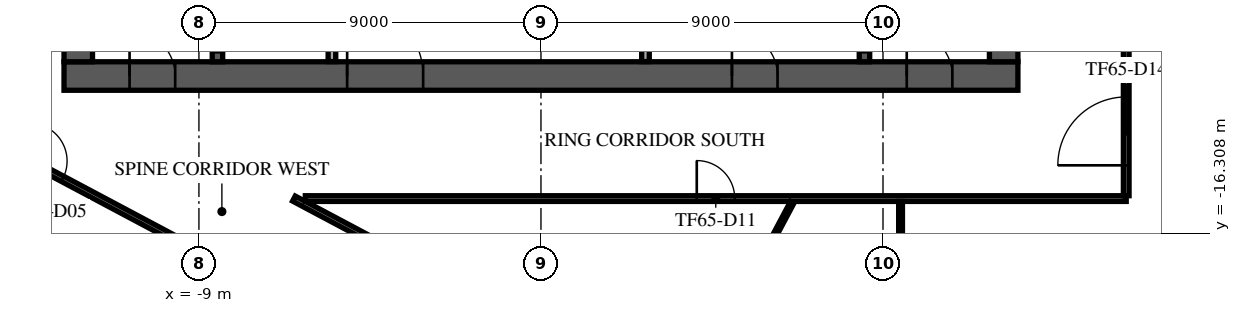
"""IFC4 building model, lengths in metres.
Left out: names, types, materials, properties, quantities, classifications, styles, units other than length and angle.
Written with IfcOpenShell. Run it as: python <this file> out.ifc"""

import sys

from ifc_helpers import new_model, si_unit, direction, frame, frame_2d, origin, place, context, subcontext, project, spatial, rectangle, extrude, element, fill, save


model = new_model("IFC4")
c1 = context("Model", 3, precision=1e-05, world=origin(), true_north=direction((0.0, 1.0)))
c2 = subcontext(c1, "Body", "Model", "MODEL_VIEW")
j1 = project(units=[si_unit("LENGTHUNIT", "METRE"), si_unit("PLANEANGLEUNIT", "RADIAN")], contexts=[c1])
p1 = place(None, origin())
s1 = spatial("IfcSite", under=j1, at=p1, CompositionType="ELEMENT")
p2 = place(p1, origin())
s2 = spatial("IfcBuilding", under=s1, at=p2, CompositionType="ELEMENT")
p3 = place(p2, frame((0.0, 0.0, 274.9)))
s3 = spatial("IfcBuildingStorey", under=s2, at=p3, CompositionType="ELEMENT", Elevation=274.9)
p4 = place(p3, frame((-12.55, -12.175, 0.0), z_axis=(0.0, 0.0, 1.0), x_axis=(1.0, 0.0, 0.0)))
e1 = element("IfcWall", 1, at=p4, inside=s3, PredefinedType="SHEAR", context=c2, shape_type="SweptSolid", body=[
    extrude(rectangle(XDim=25.1, YDim=0.75, at=frame_2d((12.55, 0.0))), origin(), (0.0, 0.0, 1.0), 3.64),
])
p5 = place(p4, frame((7.45, 0.0, 0.0)))
e2 = element("IfcOpeningElement", 2, at=p5, cuts=e1, PredefinedType="OPENING", context=c2, shape_type="SweptSolid", body=[
    extrude(rectangle(XDim=2.0, YDim=2.1, at=frame_2d((1.0, 1.05))), frame((0.0, 0.385, 0.0), z_axis=(0.0, -1.0, 0.0), x_axis=(1.0, 0.0, 0.0)), (0.0, 0.0, 1.0), 0.77),
])
p6 = place(p4, frame((17.575, 0.0, 0.0)))
e3 = element("IfcOpeningElement", 3, at=p6, cuts=e1, PredefinedType="OPENING", context=c2, shape_type="SweptSolid", body=[
    extrude(rectangle(XDim=1.2, YDim=2.1, at=frame_2d((0.6, 1.05))), frame((0.0, 0.385, 0.0), z_axis=(0.0, -1.0, 0.0), x_axis=(1.0, 0.0, 0.0)), (0.0, 0.0, 1.0), 0.77),
])
p7 = place(p4, frame((1.725, 0.0, 0.0)))
e4 = element("IfcOpeningElement", 4, at=p7, cuts=e1, PredefinedType="OPENING", context=c2, shape_type="SweptSolid", body=[
    extrude(rectangle(XDim=1.2, YDim=2.1, at=frame_2d((0.6, 1.05))), frame((0.0, 0.385, 0.0), z_axis=(0.0, -1.0, 0.0), x_axis=(1.0, 0.0, 0.0)), (0.0, 0.0, 1.0), 0.77),
])
p8 = place(p4, frame((22.175, 0.0, 0.0)))
e5 = element("IfcOpeningElement", 5, at=p8, cuts=e1, PredefinedType="OPENING", context=c2, shape_type="SweptSolid", body=[
    extrude(rectangle(XDim=1.2, YDim=2.1, at=frame_2d((0.6, 1.05))), frame((0.0, 0.385, 0.0), z_axis=(0.0, -1.0, 0.0), x_axis=(1.0, 0.0, 0.0)), (0.0, 0.0, 1.0), 0.77),
])
p9 = place(p3, frame((12.175, -11.8, 0.0), z_axis=(0.0, 0.0, 1.0), x_axis=(0.0, 1.0, 0.0)))
e6 = element("IfcWall", 6, at=p9, inside=s3, PredefinedType="SHEAR", context=c2, shape_type="SweptSolid", body=[
    extrude(rectangle(XDim=23.6, YDim=0.75, at=frame_2d((11.8, 0.0))), origin(), (0.0, 0.0, 1.0), 3.64),
])
p10 = place(p9, frame((10.6, 0.0, 0.0)))
e7 = element("IfcOpeningElement", 7, at=p10, cuts=e6, PredefinedType="OPENING", context=c2, shape_type="SweptSolid", body=[
    extrude(rectangle(XDim=2.4, YDim=2.4, at=frame_2d((1.2, 1.2))), frame((0.0, 0.385, 0.0), z_axis=(0.0, -1.0, 0.0), x_axis=(1.0, 0.0, 0.0)), (0.0, 0.0, 1.0), 0.77),
])
p11 = place(p3, frame((-12.175, -11.8, 0.0), z_axis=(0.0, 0.0, 1.0), x_axis=(0.0, 1.0, 0.0)))
e8 = element("IfcWall", 8, at=p11, inside=s3, PredefinedType="SHEAR", context=c2, shape_type="SweptSolid", body=[
    extrude(rectangle(XDim=23.6, YDim=0.75, at=frame_2d((11.8, 0.0))), origin(), (0.0, 0.0, 1.0), 3.64),
])
p12 = place(p11, frame((10.6, 0.0, 0.0)))
e9 = element("IfcOpeningElement", 9, at=p12, cuts=e8, PredefinedType="OPENING", context=c2, shape_type="SweptSolid", body=[
    extrude(rectangle(XDim=2.4, YDim=2.4, at=frame_2d((1.2, 1.2))), frame((0.0, 0.385, 0.0), z_axis=(0.0, -1.0, 0.0), x_axis=(1.0, 0.0, 0.0)), (0.0, 0.0, 1.0), 0.77),
])
p13 = place(p3, frame((-8.512, -4.55, 0.0), z_axis=(0.0, 0.0, 1.0), x_axis=(0.0, -1.0, 0.0)))
e10 = element("IfcWall", 10, at=p13, inside=s3, PredefinedType="SOLIDWALL", context=c2, shape_type="SweptSolid", body=[
    extrude(rectangle(XDim=7.25, YDim=0.275, at=frame_2d((3.625, 0.0))), origin(), (0.0, 0.0, 1.0), 3.64),
])
p14 = place(p13, frame((6.0, 0.0, 0.0)))
e11 = element("IfcOpeningElement", 11, at=p14, cuts=e10, PredefinedType="OPENING", context=c2, shape_type="SweptSolid", body=[
    extrude(rectangle(XDim=1.0, YDim=2.1, at=frame_2d((0.5, 1.05))), frame((0.0, 0.147, 0.0), z_axis=(0.0, -1.0, 0.0), x_axis=(1.0, 0.0, 0.0)), (0.0, 0.0, 1.0), 0.295),
])
p15 = place(p3, frame((8.512, -4.55, 0.0), z_axis=(0.0, 0.0, 1.0), x_axis=(0.0, -1.0, 0.0)))
e12 = element("IfcWall", 12, at=p15, inside=s3, PredefinedType="SOLIDWALL", context=c2, shape_type="SweptSolid", body=[
    extrude(rectangle(XDim=7.25, YDim=0.275, at=frame_2d((3.625, 0.0))), origin(), (0.0, 0.0, 1.0), 3.64),
])
p16 = place(p15, frame((6.0, 0.0, 0.0)))
e13 = element("IfcOpeningElement", 13, at=p16, cuts=e12, PredefinedType="OPENING", context=c2, shape_type="SweptSolid", body=[
    extrude(rectangle(XDim=1.0, YDim=2.1, at=frame_2d((0.5, 1.05))), frame((0.0, 0.147, 0.0), z_axis=(0.0, -1.0, 0.0), x_axis=(1.0, 0.0, 0.0)), (0.0, 0.0, 1.0), 0.295),
])
p17 = place(p3, frame((-5.5, -11.795, 0.0), z_axis=(0.0, 0.0, 1.0), x_axis=(0.0, 1.0, 0.0)))
e14 = element("IfcWall", 14, at=p17, inside=s3, PredefinedType="PARTITIONING", context=c2, shape_type="SweptSolid", body=[
    extrude(rectangle(XDim=2.99, YDim=0.2, at=frame_2d((1.495, 0.0))), origin(), (0.0, 0.0, 1.0), 3.64),
])
p18 = place(p17, frame((0.657, 0.0, 0.0)))
e15 = element("IfcOpeningElement", 15, at=p18, cuts=e14, PredefinedType="OPENING", context=c2, shape_type="SweptSolid", body=[
    extrude(rectangle(XDim=1.8, YDim=2.1, at=frame_2d((0.9, 1.05))), frame((0.0, 0.11, 0.0), z_axis=(0.0, -1.0, 0.0), x_axis=(1.0, 0.0, 0.0)), (0.0, 0.0, 1.0), 0.22),
])
p19 = place(p3, frame((2.75, -11.795, 0.0), z_axis=(0.0, 0.0, 1.0), x_axis=(0.0, 1.0, 0.0)))
e16 = element("IfcWall", 16, at=p19, inside=s3, PredefinedType="PARTITIONING", context=c2, shape_type="SweptSolid", body=[
    extrude(rectangle(XDim=2.99, YDim=0.2, at=frame_2d((1.495, 0.0))), origin(), (0.0, 0.0, 1.0), 3.64),
])
p20 = place(p3, frame((9.233, -32.479, 0.0), z_axis=(0.0, 0.0, 1.0), x_axis=(0.469468429065, 0.882949259081, 0.0)))
e17 = element("IfcWall", 17, at=p20, inside=s3, PredefinedType="STANDARD", context=c2, shape_type="SweptSolid", body=[
    extrude(rectangle(XDim=48.686, YDim=0.6, at=frame_2d((24.343, 0.0))), origin(), (0.0, 0.0, 1.0), 3.64),
])
p21 = place(p20, frame((1.213, 0.0, 0.9)))
e18 = element("IfcOpeningElement", 18, at=p21, cuts=e17, PredefinedType="OPENING", context=c2, shape_type="SweptSolid", body=[
    extrude(rectangle(XDim=2.0, YDim=2.1, at=frame_2d((1.0, 1.05))), frame((0.0, 0.31, 0.0), z_axis=(0.0, -1.0, 0.0), x_axis=(1.0, 0.0, 0.0)), (0.0, 0.0, 1.0), 0.62),
])
p22 = place(p20, frame((5.639, 0.0, 0.9)))
e19 = element("IfcOpeningElement", 19, at=p22, cuts=e17, PredefinedType="OPENING", context=c2, shape_type="SweptSolid", body=[
    extrude(rectangle(XDim=2.0, YDim=2.1, at=frame_2d((1.0, 1.05))), frame((0.0, 0.31, 0.0), z_axis=(0.0, -1.0, 0.0), x_axis=(1.0, 0.0, 0.0)), (0.0, 0.0, 1.0), 0.62),
])
p23 = place(p20, frame((10.065, 0.0, 0.9)))
e20 = element("IfcOpeningElement", 20, at=p23, cuts=e17, PredefinedType="OPENING", context=c2, shape_type="SweptSolid", body=[
    extrude(rectangle(XDim=2.0, YDim=2.1, at=frame_2d((1.0, 1.05))), frame((0.0, 0.31, 0.0), z_axis=(0.0, -1.0, 0.0), x_axis=(1.0, 0.0, 0.0)), (0.0, 0.0, 1.0), 0.62),
])
p24 = place(p20, frame((14.491, 0.0, 0.9)))
e21 = element("IfcOpeningElement", 21, at=p24, cuts=e17, PredefinedType="OPENING", context=c2, shape_type="SweptSolid", body=[
    extrude(rectangle(XDim=2.0, YDim=2.1, at=frame_2d((1.0, 1.05))), frame((0.0, 0.31, 0.0), z_axis=(0.0, -1.0, 0.0), x_axis=(1.0, 0.0, 0.0)), (0.0, 0.0, 1.0), 0.62),
])
p25 = place(p20, frame((18.917, 0.0, 0.9)))
e22 = element("IfcOpeningElement", 22, at=p25, cuts=e17, PredefinedType="OPENING", context=c2, shape_type="SweptSolid", body=[
    extrude(rectangle(XDim=2.0, YDim=2.1, at=frame_2d((1.0, 1.05))), frame((0.0, 0.31, 0.0), z_axis=(0.0, -1.0, 0.0), x_axis=(1.0, 0.0, 0.0)), (0.0, 0.0, 1.0), 0.62),
])
p26 = place(p20, frame((23.343, 0.0, 0.9)))
e23 = element("IfcOpeningElement", 23, at=p26, cuts=e17, PredefinedType="OPENING", context=c2, shape_type="SweptSolid", body=[
    extrude(rectangle(XDim=2.0, YDim=2.1, at=frame_2d((1.0, 1.05))), frame((0.0, 0.31, 0.0), z_axis=(0.0, -1.0, 0.0), x_axis=(1.0, 0.0, 0.0)), (0.0, 0.0, 1.0), 0.62),
])
p27 = place(p20, frame((27.769, 0.0, 0.9)))
e24 = element("IfcOpeningElement", 24, at=p27, cuts=e17, PredefinedType="OPENING", context=c2, shape_type="SweptSolid", body=[
    extrude(rectangle(XDim=2.0, YDim=2.1, at=frame_2d((1.0, 1.05))), frame((0.0, 0.31, 0.0), z_axis=(0.0, -1.0, 0.0), x_axis=(1.0, 0.0, 0.0)), (0.0, 0.0, 1.0), 0.62),
])
p28 = place(p20, frame((32.195, 0.0, 0.9)))
e25 = element("IfcOpeningElement", 25, at=p28, cuts=e17, PredefinedType="OPENING", context=c2, shape_type="SweptSolid", body=[
    extrude(rectangle(XDim=2.0, YDim=2.1, at=frame_2d((1.0, 1.05))), frame((0.0, 0.31, 0.0), z_axis=(0.0, -1.0, 0.0), x_axis=(1.0, 0.0, 0.0)), (0.0, 0.0, 1.0), 0.62),
])
p29 = place(p20, frame((36.621, 0.0, 0.9)))
e26 = element("IfcOpeningElement", 26, at=p29, cuts=e17, PredefinedType="OPENING", context=c2, shape_type="SweptSolid", body=[
    extrude(rectangle(XDim=2.0, YDim=2.1, at=frame_2d((1.0, 1.05))), frame((0.0, 0.31, 0.0), z_axis=(0.0, -1.0, 0.0), x_axis=(1.0, 0.0, 0.0)), (0.0, 0.0, 1.0), 0.62),
])
p30 = place(p20, frame((41.047, 0.0, 0.9)))
e27 = element("IfcOpeningElement", 27, at=p30, cuts=e17, PredefinedType="OPENING", context=c2, shape_type="SweptSolid", body=[
    extrude(rectangle(XDim=2.0, YDim=2.1, at=frame_2d((1.0, 1.05))), frame((0.0, 0.31, 0.0), z_axis=(0.0, -1.0, 0.0), x_axis=(1.0, 0.0, 0.0)), (0.0, 0.0, 1.0), 0.62),
])
p31 = place(p20, frame((45.473, 0.0, 0.9)))
e28 = element("IfcOpeningElement", 28, at=p31, cuts=e17, PredefinedType="OPENING", context=c2, shape_type="SweptSolid", body=[
    extrude(rectangle(XDim=2.0, YDim=2.1, at=frame_2d((1.0, 1.05))), frame((0.0, 0.31, 0.0), z_axis=(0.0, -1.0, 0.0), x_axis=(1.0, 0.0, 0.0)), (0.0, 0.0, 1.0), 0.62),
])
p32 = place(p3, frame((-26.271, -7.606, 0.0), z_axis=(0.0, 0.0, 1.0), x_axis=(0.882946860375, -0.469472940385, 0.0)))
e29 = element("IfcWall", 29, at=p32, inside=s3, PredefinedType="PARTITIONING", context=c2, shape_type="SweptSolid", body=[
    extrude(rectangle(XDim=39.325, YDim=0.15, at=frame_2d((19.662, 0.0))), origin(), (0.0, 0.0, 1.0), 3.04),
])
p33 = place(p32, frame((2.8, 0.0, 0.0)))
e30 = element("IfcOpeningElement", 30, at=p33, cuts=e29, PredefinedType="OPENING", context=c2, shape_type="SweptSolid", body=[
    extrude(rectangle(XDim=1.0, YDim=2.1, at=frame_2d((0.5, 1.05))), frame((0.0, 0.085, 0.0), z_axis=(0.0, -1.0, 0.0), x_axis=(1.0, 0.0, 0.0)), (0.0, 0.0, 1.0), 0.17),
])
p34 = place(p32, frame((6.915, 0.0, 0.0)))
e31 = element("IfcOpeningElement", 31, at=p34, cuts=e29, PredefinedType="OPENING", context=c2, shape_type="SweptSolid", body=[
    extrude(rectangle(XDim=1.0, YDim=2.1, at=frame_2d((0.5, 1.05))), frame((0.0, 0.085, 0.0), z_axis=(0.0, -1.0, 0.0), x_axis=(1.0, 0.0, 0.0)), (0.0, 0.0, 1.0), 0.17),
])
p35 = place(p32, frame((14.499, 0.0, 0.0)))
e32 = element("IfcOpeningElement", 32, at=p35, cuts=e29, PredefinedType="OPENING", context=c2, shape_type="SweptSolid", body=[
    extrude(rectangle(XDim=1.0, YDim=2.1, at=frame_2d((0.5, 1.05))), frame((0.0, 0.085, 0.0), z_axis=(0.0, -1.0, 0.0), x_axis=(1.0, 0.0, 0.0)), (0.0, 0.0, 1.0), 0.17),
])
p36 = place(p32, frame((25.785, 0.0, 0.0)))
e33 = element("IfcOpeningElement", 33, at=p36, cuts=e29, PredefinedType="OPENING", context=c2, shape_type="SweptSolid", body=[
    extrude(rectangle(XDim=1.0, YDim=2.1, at=frame_2d((0.5, 1.05))), frame((0.0, 0.085, 0.0), z_axis=(0.0, -1.0, 0.0), x_axis=(1.0, 0.0, 0.0)), (0.0, 0.0, 1.0), 0.17),
])
p37 = place(p32, frame((37.741, 0.0, 0.0)))
e34 = element("IfcOpeningElement", 34, at=p37, cuts=e29, PredefinedType="OPENING", context=c2, shape_type="SweptSolid", body=[
    extrude(rectangle(XDim=1.0, YDim=2.1, at=frame_2d((0.5, 1.05))), frame((0.0, 0.085, 0.0), z_axis=(0.0, -1.0, 0.0), x_axis=(1.0, 0.0, 0.0)), (0.0, 0.0, 1.0), 0.17),
])
p38 = place(p3, frame((-6.501, -15.4, 0.0), z_axis=(0.0, 0.0, 1.0), x_axis=(0.882952324659, -0.469462663456, 0.0)))
e35 = element("IfcWall", 35, at=p38, inside=s3, PredefinedType="PARTITIONING", context=c2, shape_type="SweptSolid", body=[
    extrude(rectangle(XDim=18.21, YDim=0.15, at=frame_2d((9.105, 0.0))), origin(), (0.0, 0.0, 1.0), 3.04),
])
p39 = place(p38, frame((12.924, 0.0, 0.0)))
e36 = element("IfcOpeningElement", 36, at=p39, cuts=e35, PredefinedType="OPENING", context=c2, shape_type="SweptSolid", body=[
    extrude(rectangle(XDim=1.0, YDim=2.1, at=frame_2d((0.5, 1.05))), frame((0.0, 0.085, 0.0), z_axis=(0.0, -1.0, 0.0), x_axis=(1.0, 0.0, 0.0)), (0.0, 0.0, 1.0), 0.17),
])
p40 = place(p3, frame((-6.2, -15.4, 0.0), z_axis=(0.0, 0.0, 1.0), x_axis=(1.0, 0.0, 0.0)))
e37 = element("IfcWall", 37, at=p40, inside=s3, PredefinedType="PARTITIONING", context=c2, shape_type="SweptSolid", body=[
    extrude(rectangle(XDim=21.6, YDim=0.15, at=frame_2d((10.8, 0.0))), origin(), (0.0, 0.0, 1.0), 3.24),
])
p41 = place(p40, frame((10.3, 0.0, 0.0)))
e38 = element("IfcOpeningElement", 38, at=p41, cuts=e37, PredefinedType="OPENING", context=c2, shape_type="SweptSolid", body=[
    extrude(rectangle(XDim=1.0, YDim=2.1, at=frame_2d((0.5, 1.05))), frame((0.0, 0.085, 0.0), z_axis=(0.0, -1.0, 0.0), x_axis=(1.0, 0.0, 0.0)), (0.0, 0.0, 1.0), 0.17),
])
p42 = place(p3, frame((15.4, -15.325, 0.0), z_axis=(0.0, 0.0, 1.0), x_axis=(0.0, 1.0, 0.0)))
e39 = element("IfcWall", 39, at=p42, inside=s3, PredefinedType="PARTITIONING", context=c2, shape_type="SweptSolid", body=[
    extrude(rectangle(XDim=25.993, YDim=0.15, at=frame_2d((12.997, 0.0))), origin(), (0.0, 0.0, 1.0), 3.24),
])
p43 = place(p42, frame((0.8, 0.0, 0.0)))
e40 = element("IfcOpeningElement", 40, at=p43, cuts=e39, PredefinedType="OPENING", context=c2, shape_type="SweptSolid", body=[
    extrude(rectangle(XDim=1.8, YDim=2.1, at=frame_2d((0.9, 1.05))), frame((0.0, 0.085, 0.0), z_axis=(0.0, -1.0, 0.0), x_axis=(1.0, 0.0, 0.0)), (0.0, 0.0, 1.0), 0.17),
])
p44 = place(p42, frame((11.567, 0.0, 0.0)))
e41 = element("IfcOpeningElement", 41, at=p44, cuts=e39, PredefinedType="OPENING", context=c2, shape_type="SweptSolid", body=[
    extrude(rectangle(XDim=1.0, YDim=2.1, at=frame_2d((0.5, 1.05))), frame((0.0, 0.085, 0.0), z_axis=(0.0, -1.0, 0.0), x_axis=(1.0, 0.0, 0.0)), (0.0, 0.0, 1.0), 0.17),
])
p45 = place(p42, frame((23.696, 0.0, 0.0)))
e42 = element("IfcOpeningElement", 42, at=p45, cuts=e39, PredefinedType="OPENING", context=c2, shape_type="SweptSolid", body=[
    extrude(rectangle(XDim=1.0, YDim=2.1, at=frame_2d((0.5, 1.05))), frame((0.0, 0.085, 0.0), z_axis=(0.0, -1.0, 0.0), x_axis=(1.0, 0.0, 0.0)), (0.0, 0.0, 1.0), 0.17),
])
p46 = place(p3, frame((3.797, -20.791, 0.0), z_axis=(0.0, 0.0, 1.0), x_axis=(0.469539343426, 0.882911549916, 0.0)))
e43 = element("IfcWall", 43, at=p46, inside=s3, PredefinedType="PARTITIONING", context=c2, shape_type="SweptSolid", body=[
    extrude(rectangle(XDim=5.994, YDim=0.1, at=frame_2d((2.997, 0.0))), origin(), (0.0, 0.0, 1.0), 3.24),
])
p47 = place(p3, frame((9.462, -23.775, 0.0), z_axis=(0.0, 0.0, 1.0), x_axis=(0.0, 1.0, 0.0)))
e44 = element("IfcWall", 44, at=p47, inside=s3, PredefinedType="PARTITIONING", context=c2, shape_type="SweptSolid", body=[
    extrude(rectangle(XDim=8.3, YDim=0.1, at=frame_2d((4.15, 0.0))), origin(), (0.0, 0.0, 1.0), 3.04),
])
p48 = place(p5, origin())
e45 = element("IfcDoor", 45, at=p48, inside=s3, OperationType="SINGLE_SWING_LEFT", PredefinedType="DOOR", context=c2, shape_type="SweptSolid", body=[
    extrude(rectangle(XDim=2.0, YDim=2.1, at=frame_2d((1.0, 1.05))), frame((0.0, 0.025, 0.0), z_axis=(0.0, -1.0, 0.0), x_axis=(1.0, 0.0, 0.0)), (0.0, 0.0, 1.0), 0.05),
])
fill(e2, e45)
p49 = place(p6, origin())
e46 = element("IfcDoor", 46, at=p49, inside=s3, OperationType="SINGLE_SWING_LEFT", PredefinedType="DOOR", context=c2, shape_type="SweptSolid", body=[
    extrude(rectangle(XDim=1.2, YDim=2.1, at=frame_2d((0.6, 1.05))), frame((0.0, 0.025, 0.0), z_axis=(0.0, -1.0, 0.0), x_axis=(1.0, 0.0, 0.0)), (0.0, 0.0, 1.0), 0.05),
])
fill(e3, e46)
p50 = place(p7, origin())
e47 = element("IfcDoor", 47, at=p50, inside=s3, OperationType="SINGLE_SWING_LEFT", PredefinedType="DOOR", context=c2, shape_type="SweptSolid", body=[
    extrude(rectangle(XDim=1.2, YDim=2.1, at=frame_2d((0.6, 1.05))), frame((0.0, 0.025, 0.0), z_axis=(0.0, -1.0, 0.0), x_axis=(1.0, 0.0, 0.0)), (0.0, 0.0, 1.0), 0.05),
])
fill(e4, e47)
p51 = place(p8, origin())
e48 = element("IfcDoor", 48, at=p51, inside=s3, OperationType="SINGLE_SWING_LEFT", PredefinedType="DOOR", context=c2, shape_type="SweptSolid", body=[
    extrude(rectangle(XDim=1.2, YDim=2.1, at=frame_2d((0.6, 1.05))), frame((0.0, 0.025, 0.0), z_axis=(0.0, -1.0, 0.0), x_axis=(1.0, 0.0, 0.0)), (0.0, 0.0, 1.0), 0.05),
])
fill(e5, e48)
p52 = place(p35, frame((1.0, 0.0, 0.0), z_axis=(0.0, 0.0, 1.0), x_axis=(-1.0, 0.0, 0.0)))
e49 = element("IfcDoor", 49, at=p52, inside=s3, OperationType="SINGLE_SWING_RIGHT", PredefinedType="DOOR", context=c2, shape_type="SweptSolid", body=[
    extrude(rectangle(XDim=1.0, YDim=2.1, at=frame_2d((0.5, 1.05))), frame((0.0, 0.025, 0.0), z_axis=(0.0, -1.0, 0.0), x_axis=(1.0, 0.0, 0.0)), (0.0, 0.0, 1.0), 0.05),
])
fill(e32, e49)
p53 = place(p41, frame((1.0, 0.0, 0.0), z_axis=(0.0, 0.0, 1.0), x_axis=(-1.0, 0.0, 0.0)))
e50 = element("IfcDoor", 50, at=p53, inside=s3, OperationType="SINGLE_SWING_LEFT", PredefinedType="DOOR", context=c2, shape_type="SweptSolid", body=[
    extrude(rectangle(XDim=1.0, YDim=2.1, at=frame_2d((0.5, 1.05))), frame((0.0, 0.025, 0.0), z_axis=(0.0, -1.0, 0.0), x_axis=(1.0, 0.0, 0.0)), (0.0, 0.0, 1.0), 0.05),
])
fill(e38, e50)
p54 = place(p43, frame((1.8, 0.0, 0.0), z_axis=(0.0, 0.0, 1.0), x_axis=(-1.0, 0.0, 0.0)))
e51 = element("IfcDoor", 51, at=p54, inside=s3, OperationType="DOUBLE_DOOR_SINGLE_SWING", PredefinedType="DOOR", context=c2, shape_type="SweptSolid", body=[
    extrude(rectangle(XDim=1.8, YDim=2.1, at=frame_2d((0.9, 1.05))), frame((0.0, 0.025, 0.0), z_axis=(0.0, -1.0, 0.0), x_axis=(1.0, 0.0, 0.0)), (0.0, 0.0, 1.0), 0.05),
])
fill(e40, e51)
save(model, sys.argv[1])
